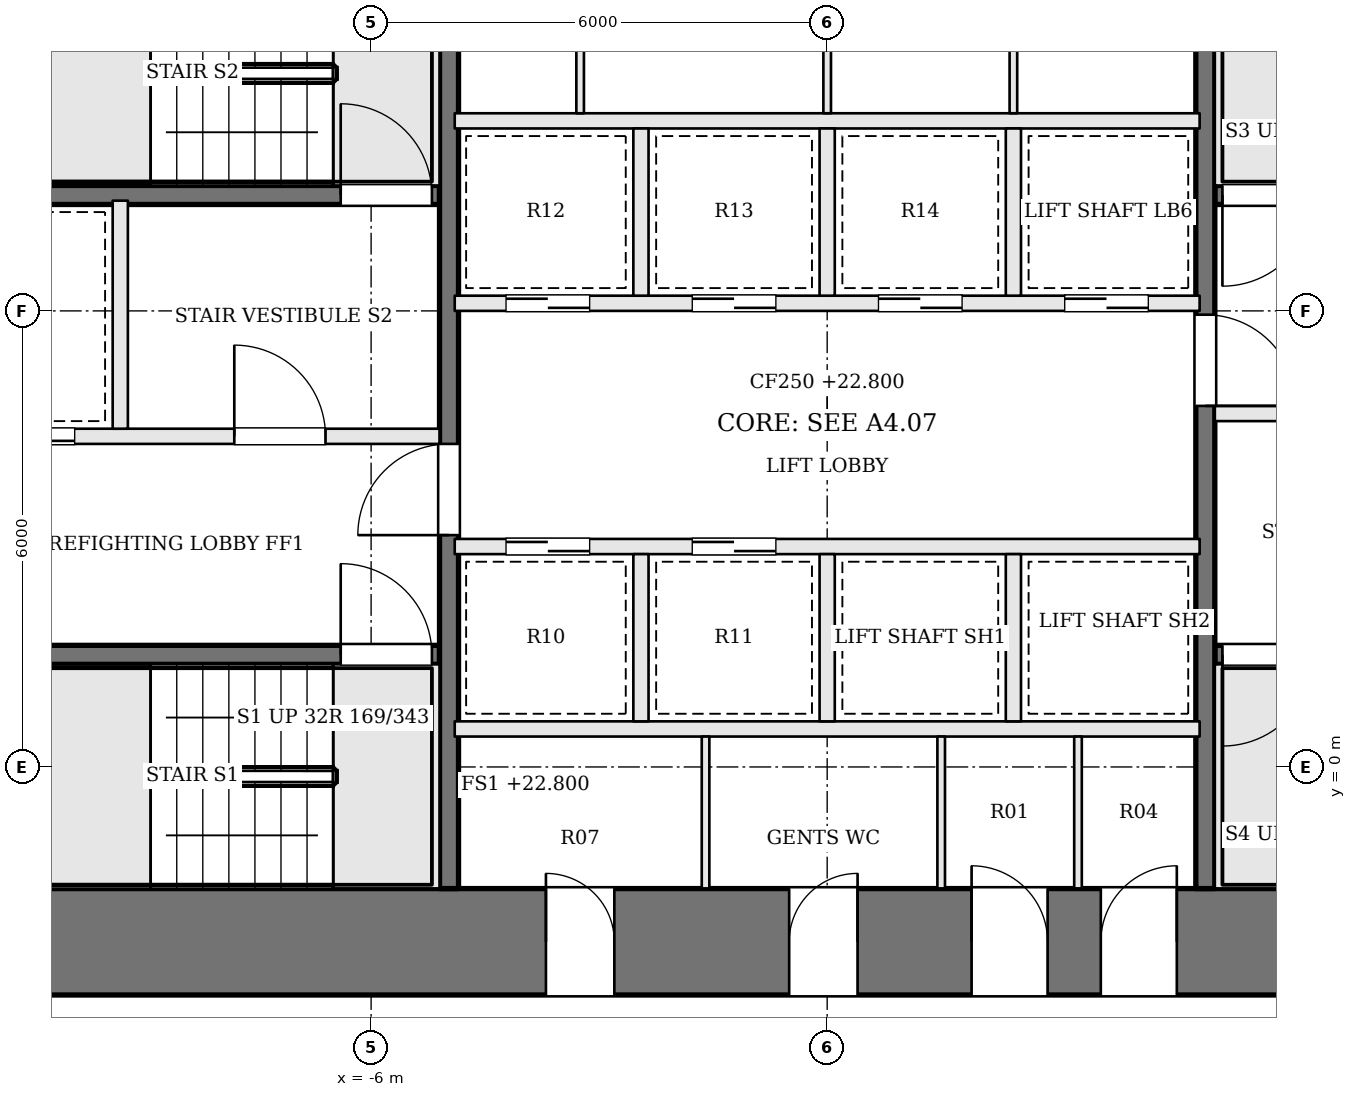
"""IFC4 building model, lengths in metres.
Left out: names, types, materials, properties, quantities, classifications, styles, units other than length and angle.
Written with IfcOpenShell. Run it as: python <this file> out.ifc"""

import sys

from ifc_helpers import new_model, si_unit, direction, frame, frame_2d, origin, place, context, subcontext, project, spatial, rectangle, extrude, element, fill, save


model = new_model("IFC4")
c1 = context("Model", 3, precision=1e-05, world=origin(), true_north=direction((0.0, 1.0)))
c2 = subcontext(c1, "Body", "Model", "MODEL_VIEW")
j1 = project(units=[si_unit("LENGTHUNIT", "METRE"), si_unit("PLANEANGLEUNIT", "RADIAN")], contexts=[c1])
p1 = place(None, origin())
s1 = spatial("IfcSite", under=j1, at=p1, CompositionType="ELEMENT")
p2 = place(p1, origin())
s2 = spatial("IfcBuilding", under=s1, at=p2, CompositionType="ELEMENT")
p3 = place(p2, frame((0.0, 0.0, 22.8)))
s3 = spatial("IfcBuildingStorey", under=s2, at=p3, CompositionType="ELEMENT", Elevation=22.8)
p4 = place(p3, frame((-13.0, -2.3, 0.0), z_axis=(0.0, 0.0, 1.0), x_axis=(1.0, 0.0, 0.0)))
e1 = element("IfcWall", 1, at=p4, inside=s3, PredefinedType="SHEAR", context=c2, shape_type="SweptSolid", body=[
    extrude(rectangle(XDim=26.0, YDim=1.4, at=frame_2d((13.0, 0.0))), origin(), (0.0, 0.0, 1.0), 5.4),
])
p5 = place(p4, frame((9.3, 0.0, 0.0)))
e2 = element("IfcOpeningElement", 2, at=p5, cuts=e1, PredefinedType="OPENING", context=c2, shape_type="SweptSolid", body=[
    extrude(rectangle(XDim=0.9, YDim=2.1, at=frame_2d((0.45, 1.05))), frame((0.0, 0.71, 0.0), z_axis=(0.0, -1.0, 0.0), x_axis=(1.0, 0.0, 0.0)), (0.0, 0.0, 1.0), 1.42),
])
p6 = place(p4, frame((12.5, 0.0, 0.0)))
e3 = element("IfcOpeningElement", 3, at=p6, cuts=e1, PredefinedType="OPENING", context=c2, shape_type="SweptSolid", body=[
    extrude(rectangle(XDim=0.9, YDim=2.1, at=frame_2d((0.45, 1.05))), frame((0.0, 0.71, 0.0), z_axis=(0.0, -1.0, 0.0), x_axis=(1.0, 0.0, 0.0)), (0.0, 0.0, 1.0), 1.42),
])
p7 = place(p4, frame((14.9, 0.0, 0.0)))
e4 = element("IfcOpeningElement", 4, at=p7, cuts=e1, PredefinedType="OPENING", context=c2, shape_type="SweptSolid", body=[
    extrude(rectangle(XDim=1.0, YDim=2.1, at=frame_2d((0.5, 1.05))), frame((0.0, 0.71, 0.0), z_axis=(0.0, -1.0, 0.0), x_axis=(1.0, 0.0, 0.0)), (0.0, 0.0, 1.0), 1.42),
])
p8 = place(p4, frame((16.6, 0.0, 0.0)))
e5 = element("IfcOpeningElement", 5, at=p8, cuts=e1, PredefinedType="OPENING", context=c2, shape_type="SweptSolid", body=[
    extrude(rectangle(XDim=1.0, YDim=2.1, at=frame_2d((0.5, 1.05))), frame((0.0, 0.71, 0.0), z_axis=(0.0, -1.0, 0.0), x_axis=(1.0, 0.0, 0.0)), (0.0, 0.0, 1.0), 1.42),
])
p9 = place(p3, frame((-11.6, 1.475, 0.0), z_axis=(0.0, 0.0, 1.0), x_axis=(1.0, 0.0, 0.0)))
e6 = element("IfcWall", 6, at=p9, inside=s3, PredefinedType="SOLIDWALL", context=c2, shape_type="SweptSolid", body=[
    extrude(rectangle(XDim=6.5, YDim=0.25, at=frame_2d((3.25, 0.0))), origin(), (0.0, 0.0, 1.0), 5.15),
])
p10 = place(p9, frame((5.2, 0.0, 0.0)))
e7 = element("IfcOpeningElement", 7, at=p10, cuts=e6, PredefinedType="OPENING", context=c2, shape_type="SweptSolid", body=[
    extrude(rectangle(XDim=1.2, YDim=2.1, at=frame_2d((0.6, 1.05))), frame((0.0, 0.135, 0.0), z_axis=(0.0, -1.0, 0.0), x_axis=(1.0, 0.0, 0.0)), (0.0, 0.0, 1.0), 0.27),
])
p11 = place(p3, frame((11.6, 7.525, 0.0), z_axis=(0.0, 0.0, 1.0), x_axis=(-1.0, 0.0, 0.0)))
e8 = element("IfcWall", 8, at=p11, inside=s3, PredefinedType="SOLIDWALL", context=c2, shape_type="SweptSolid", body=[
    extrude(rectangle(XDim=6.5, YDim=0.25, at=frame_2d((3.25, 0.0))), origin(), (0.0, 0.0, 1.0), 5.15),
])
p12 = place(p11, frame((5.2, 0.0, 0.0)))
e9 = element("IfcOpeningElement", 9, at=p12, cuts=e8, PredefinedType="OPENING", context=c2, shape_type="SweptSolid", body=[
    extrude(rectangle(XDim=1.2, YDim=2.1, at=frame_2d((0.6, 1.05))), frame((0.0, 0.135, 0.0), z_axis=(0.0, -1.0, 0.0), x_axis=(1.0, 0.0, 0.0)), (0.0, 0.0, 1.0), 0.27),
])
p13 = place(p3, frame((-11.6, 4.35, 0.0), z_axis=(0.0, 0.0, 1.0), x_axis=(1.0, 0.0, 0.0)))
e10 = element("IfcWall", 10, at=p13, inside=s3, PredefinedType="SOLIDWALL", context=c2, shape_type="SweptSolid", body=[
    extrude(rectangle(XDim=6.5, YDim=0.2, at=frame_2d((3.25, 0.0))), origin(), (0.0, 0.0, 1.0), 5.15),
])
p14 = place(p13, frame((3.8, 0.0, 0.0)))
e11 = element("IfcOpeningElement", 11, at=p14, cuts=e10, PredefinedType="OPENING", context=c2, shape_type="SweptSolid", body=[
    extrude(rectangle(XDim=1.2, YDim=2.1, at=frame_2d((0.6, 1.05))), frame((0.0, 0.11, 0.0), z_axis=(0.0, -1.0, 0.0), x_axis=(1.0, 0.0, 0.0)), (0.0, 0.0, 1.0), 0.22),
])
p15 = place(p13, frame((0.5, 0.0, 0.0)))
e12 = element("IfcOpeningElement", 12, at=p15, cuts=e10, PredefinedType="OPENING", context=c2, shape_type="SweptSolid", body=[
    extrude(rectangle(XDim=1.2, YDim=2.1, at=frame_2d((0.6, 1.05))), frame((0.0, 0.11, 0.0), z_axis=(0.0, -1.0, 0.0), x_axis=(1.0, 0.0, 0.0)), (0.0, 0.0, 1.0), 0.22),
])
p16 = place(p3, frame((11.6, 4.65, 0.0), z_axis=(0.0, 0.0, 1.0), x_axis=(-1.0, 0.0, 0.0)))
e13 = element("IfcWall", 13, at=p16, inside=s3, PredefinedType="SOLIDWALL", context=c2, shape_type="SweptSolid", body=[
    extrude(rectangle(XDim=6.5, YDim=0.2, at=frame_2d((3.25, 0.0))), origin(), (0.0, 0.0, 1.0), 5.15),
])
p17 = place(p16, frame((3.8, 0.0, 0.0)))
e14 = element("IfcOpeningElement", 14, at=p17, cuts=e13, PredefinedType="OPENING", context=c2, shape_type="SweptSolid", body=[
    extrude(rectangle(XDim=1.2, YDim=2.1, at=frame_2d((0.6, 1.05))), frame((0.0, 0.11, 0.0), z_axis=(0.0, -1.0, 0.0), x_axis=(1.0, 0.0, 0.0)), (0.0, 0.0, 1.0), 0.22),
])
p18 = place(p16, frame((0.5, 0.0, 0.0)))
e15 = element("IfcOpeningElement", 15, at=p18, cuts=e13, PredefinedType="OPENING", context=c2, shape_type="SweptSolid", body=[
    extrude(rectangle(XDim=1.2, YDim=2.1, at=frame_2d((0.6, 1.05))), frame((0.0, 0.11, 0.0), z_axis=(0.0, -1.0, 0.0), x_axis=(1.0, 0.0, 0.0)), (0.0, 0.0, 1.0), 0.22),
])
p19 = place(p3, frame((-11.6, 7.525, 0.0), z_axis=(0.0, 0.0, 1.0), x_axis=(1.0, 0.0, 0.0)))
e16 = element("IfcWall", 16, at=p19, inside=s3, PredefinedType="SOLIDWALL", context=c2, shape_type="SweptSolid", body=[
    extrude(rectangle(XDim=6.5, YDim=0.25, at=frame_2d((3.25, 0.0))), origin(), (0.0, 0.0, 1.0), 5.15),
])
p20 = place(p19, frame((5.2, 0.0, 0.0)))
e17 = element("IfcOpeningElement", 17, at=p20, cuts=e16, PredefinedType="OPENING", context=c2, shape_type="SweptSolid", body=[
    extrude(rectangle(XDim=1.2, YDim=2.1, at=frame_2d((0.6, 1.05))), frame((0.0, 0.135, 0.0), z_axis=(0.0, -1.0, 0.0), x_axis=(1.0, 0.0, 0.0)), (0.0, 0.0, 1.0), 0.27),
])
p21 = place(p3, frame((11.6, 1.475, 0.0), z_axis=(0.0, 0.0, 1.0), x_axis=(-1.0, 0.0, 0.0)))
e18 = element("IfcWall", 18, at=p21, inside=s3, PredefinedType="SOLIDWALL", context=c2, shape_type="SweptSolid", body=[
    extrude(rectangle(XDim=6.5, YDim=0.25, at=frame_2d((3.25, 0.0))), origin(), (0.0, 0.0, 1.0), 5.15),
])
p22 = place(p21, frame((5.2, 0.0, 0.0)))
e19 = element("IfcOpeningElement", 19, at=p22, cuts=e18, PredefinedType="OPENING", context=c2, shape_type="SweptSolid", body=[
    extrude(rectangle(XDim=1.2, YDim=2.1, at=frame_2d((0.6, 1.05))), frame((0.0, 0.135, 0.0), z_axis=(0.0, -1.0, 0.0), x_axis=(1.0, 0.0, 0.0)), (0.0, 0.0, 1.0), 0.27),
])
p23 = place(p3, frame((-9.3, 4.45, 0.0), z_axis=(0.0, 0.0, 1.0), x_axis=(0.0, 1.0, 0.0)))
e20 = element("IfcWall", 20, at=p23, inside=s3, PredefinedType="SOLIDWALL", context=c2, shape_type="SweptSolid", body=[
    extrude(rectangle(XDim=3.0, YDim=0.2, at=frame_2d((1.5, 0.0))), origin(), (0.0, 0.0, 1.0), 5.15),
])
p24 = place(p3, frame((-4.975, -1.6, 0.0), z_axis=(0.0, 0.0, 1.0), x_axis=(0.0, 1.0, 0.0)))
e21 = element("IfcWall", 21, at=p24, inside=s3, PredefinedType="SOLIDWALL", context=c2, shape_type="SweptSolid", body=[
    extrude(rectangle(XDim=12.2, YDim=0.25, at=frame_2d((6.1, 0.0))), origin(), (0.0, 0.0, 1.0), 5.15),
])
p25 = place(p24, frame((4.65, 0.0, 0.0)))
e22 = element("IfcOpeningElement", 22, at=p25, cuts=e21, PredefinedType="OPENING", context=c2, shape_type="SweptSolid", body=[
    extrude(rectangle(XDim=1.2, YDim=2.1, at=frame_2d((0.6, 1.05))), frame((0.0, 0.135, 0.0), z_axis=(0.0, -1.0, 0.0), x_axis=(1.0, 0.0, 0.0)), (0.0, 0.0, 1.0), 0.27),
])
p26 = place(p3, frame((4.975, 10.6, 0.0), z_axis=(0.0, 0.0, 1.0), x_axis=(0.0, -1.0, 0.0)))
e23 = element("IfcWall", 23, at=p26, inside=s3, PredefinedType="SOLIDWALL", context=c2, shape_type="SweptSolid", body=[
    extrude(rectangle(XDim=12.2, YDim=0.25, at=frame_2d((6.1, 0.0))), origin(), (0.0, 0.0, 1.0), 5.15),
])
p27 = place(p26, frame((4.65, 0.0, 0.0)))
e24 = element("IfcOpeningElement", 24, at=p27, cuts=e23, PredefinedType="OPENING", context=c2, shape_type="SweptSolid", body=[
    extrude(rectangle(XDim=1.2, YDim=2.1, at=frame_2d((0.6, 1.05))), frame((0.0, 0.135, 0.0), z_axis=(0.0, -1.0, 0.0), x_axis=(1.0, 0.0, 0.0)), (0.0, 0.0, 1.0), 0.27),
])
p28 = place(p3, frame((-4.9, 0.5, 0.0), z_axis=(0.0, 0.0, 1.0), x_axis=(1.0, 0.0, 0.0)))
e25 = element("IfcWall", 25, at=p28, inside=s3, PredefinedType="SOLIDWALL", context=c2, shape_type="SweptSolid", body=[
    extrude(rectangle(XDim=9.8, YDim=0.2, at=frame_2d((4.9, 0.0))), origin(), (0.0, 0.0, 1.0), 5.15),
])
p29 = place(p3, frame((-4.9, 2.9, 0.0), z_axis=(0.0, 0.0, 1.0), x_axis=(1.0, 0.0, 0.0)))
e26 = element("IfcWall", 26, at=p29, inside=s3, PredefinedType="SOLIDWALL", context=c2, shape_type="SweptSolid", body=[
    extrude(rectangle(XDim=9.8, YDim=0.2, at=frame_2d((4.9, 0.0))), origin(), (0.0, 0.0, 1.0), 5.15),
])
p30 = place(p29, frame((0.675, 0.0, 0.0)))
e27 = element("IfcOpeningElement", 27, at=p30, cuts=e26, PredefinedType="OPENING", context=c2, shape_type="SweptSolid", body=[
    extrude(rectangle(XDim=1.1, YDim=2.1, at=frame_2d((0.55, 1.05))), frame((0.0, 0.11, 0.0), z_axis=(0.0, -1.0, 0.0), x_axis=(1.0, 0.0, 0.0)), (0.0, 0.0, 1.0), 0.22),
])
p31 = place(p29, frame((3.125, 0.0, 0.0)))
e28 = element("IfcOpeningElement", 28, at=p31, cuts=e26, PredefinedType="OPENING", context=c2, shape_type="SweptSolid", body=[
    extrude(rectangle(XDim=1.1, YDim=2.1, at=frame_2d((0.55, 1.05))), frame((0.0, 0.11, 0.0), z_axis=(0.0, -1.0, 0.0), x_axis=(1.0, 0.0, 0.0)), (0.0, 0.0, 1.0), 0.22),
])
p32 = place(p3, frame((-4.9, 6.1, 0.0), z_axis=(0.0, 0.0, 1.0), x_axis=(1.0, 0.0, 0.0)))
e29 = element("IfcWall", 29, at=p32, inside=s3, PredefinedType="SOLIDWALL", context=c2, shape_type="SweptSolid", body=[
    extrude(rectangle(XDim=9.8, YDim=0.2, at=frame_2d((4.9, 0.0))), origin(), (0.0, 0.0, 1.0), 5.15),
])
p33 = place(p32, frame((0.675, 0.0, 0.0)))
e30 = element("IfcOpeningElement", 30, at=p33, cuts=e29, PredefinedType="OPENING", context=c2, shape_type="SweptSolid", body=[
    extrude(rectangle(XDim=1.1, YDim=2.1, at=frame_2d((0.55, 1.05))), frame((0.0, 0.11, 0.0), z_axis=(0.0, -1.0, 0.0), x_axis=(1.0, 0.0, 0.0)), (0.0, 0.0, 1.0), 0.22),
])
p34 = place(p32, frame((3.125, 0.0, 0.0)))
e31 = element("IfcOpeningElement", 31, at=p34, cuts=e29, PredefinedType="OPENING", context=c2, shape_type="SweptSolid", body=[
    extrude(rectangle(XDim=1.1, YDim=2.1, at=frame_2d((0.55, 1.05))), frame((0.0, 0.11, 0.0), z_axis=(0.0, -1.0, 0.0), x_axis=(1.0, 0.0, 0.0)), (0.0, 0.0, 1.0), 0.22),
])
p35 = place(p32, frame((5.575, 0.0, 0.0)))
e32 = element("IfcOpeningElement", 32, at=p35, cuts=e29, PredefinedType="OPENING", context=c2, shape_type="SweptSolid", body=[
    extrude(rectangle(XDim=1.1, YDim=2.1, at=frame_2d((0.55, 1.05))), frame((0.0, 0.11, 0.0), z_axis=(0.0, -1.0, 0.0), x_axis=(1.0, 0.0, 0.0)), (0.0, 0.0, 1.0), 0.22),
])
p36 = place(p32, frame((8.025, 0.0, 0.0)))
e33 = element("IfcOpeningElement", 33, at=p36, cuts=e29, PredefinedType="OPENING", context=c2, shape_type="SweptSolid", body=[
    extrude(rectangle(XDim=1.1, YDim=2.1, at=frame_2d((0.55, 1.05))), frame((0.0, 0.11, 0.0), z_axis=(0.0, -1.0, 0.0), x_axis=(1.0, 0.0, 0.0)), (0.0, 0.0, 1.0), 0.22),
])
p37 = place(p3, frame((-4.9, 8.5, 0.0), z_axis=(0.0, 0.0, 1.0), x_axis=(1.0, 0.0, 0.0)))
e34 = element("IfcWall", 34, at=p37, inside=s3, PredefinedType="SOLIDWALL", context=c2, shape_type="SweptSolid", body=[
    extrude(rectangle(XDim=9.8, YDim=0.2, at=frame_2d((4.9, 0.0))), origin(), (0.0, 0.0, 1.0), 5.15),
])
for number, where, z_axis, x_axis in (
    (35, (-2.45, 0.6, 0.0), (0.0, 0.0, 1.0), (0.0, 1.0, 0.0)),
    (36, (0.0, 0.6, 0.0), (0.0, 0.0, 1.0), (0.0, 1.0, 0.0)),
    (37, (2.45, 0.6, 0.0), (0.0, 0.0, 1.0), (0.0, 1.0, 0.0)),
    (38, (-2.45, 6.2, 0.0), (0.0, 0.0, 1.0), (0.0, 1.0, 0.0)),
    (39, (0.0, 6.2, 0.0), (0.0, 0.0, 1.0), (0.0, 1.0, 0.0)),
    (40, (2.45, 6.2, 0.0), (0.0, 0.0, 1.0), (0.0, 1.0, 0.0)),
):
    element("IfcWall", number, at=place(p3, frame(where, z_axis=z_axis, x_axis=x_axis)), inside=s3, PredefinedType="SOLIDWALL", context=c2, shape_type="SweptSolid", body=[
        extrude(rectangle(XDim=2.2, YDim=0.2, at=frame_2d((1.1, 0.0))), origin(), (0.0, 0.0, 1.0), 5.15),
    ])
for number, where, z_axis, x_axis in (
    (41, (-1.6, -1.6, 0.0), (0.0, 0.0, 1.0), (0.0, 1.0, 0.0)),
    (42, (1.5, -1.6, 0.0), (0.0, 0.0, 1.0), (0.0, 1.0, 0.0)),
    (43, (3.3, -1.6, 0.0), (0.0, 0.0, 1.0), (0.0, 1.0, 0.0)),
    (44, (-3.25, 8.6, 0.0), (0.0, 0.0, 1.0), (0.0, 1.0, 0.0)),
    (45, (0.0, 8.6, 0.0), (0.0, 0.0, 1.0), (0.0, 1.0, 0.0)),
    (46, (2.45, 8.6, 0.0), (0.0, 0.0, 1.0), (0.0, 1.0, 0.0)),
):
    element("IfcWall", number, at=place(p3, frame(where, z_axis=z_axis, x_axis=x_axis)), inside=s3, PredefinedType="PARTITIONING", context=c2, shape_type="SweptSolid", body=[
        extrude(rectangle(XDim=2.0, YDim=0.1, at=frame_2d((1.0, 0.0))), origin(), (0.0, 0.0, 1.0), 5.15),
    ])
p38 = place(p25, origin())
e47 = element("IfcDoor", 47, at=p38, inside=s3, OperationType="SINGLE_SWING_LEFT", PredefinedType="DOOR", context=c2, shape_type="SweptSolid", body=[
    extrude(rectangle(XDim=1.2, YDim=2.1, at=frame_2d((0.6, 1.05))), frame((0.0, 0.025, 0.0), z_axis=(0.0, -1.0, 0.0), x_axis=(1.0, 0.0, 0.0)), (0.0, 0.0, 1.0), 0.05),
])
fill(e22, e47)
p39 = place(p27, origin())
e48 = element("IfcDoor", 48, at=p39, inside=s3, OperationType="SINGLE_SWING_RIGHT", PredefinedType="DOOR", context=c2, shape_type="SweptSolid", body=[
    extrude(rectangle(XDim=1.2, YDim=2.1, at=frame_2d((0.6, 1.05))), frame((0.0, 0.025, 0.0), z_axis=(0.0, -1.0, 0.0), x_axis=(1.0, 0.0, 0.0)), (0.0, 0.0, 1.0), 0.05),
])
fill(e24, e48)
p40 = place(p14, origin())
e49 = element("IfcDoor", 49, at=p40, inside=s3, OperationType="SINGLE_SWING_LEFT", PredefinedType="DOOR", context=c2, shape_type="SweptSolid", body=[
    extrude(rectangle(XDim=1.2, YDim=2.1, at=frame_2d((0.6, 1.05))), frame((0.0, 0.025, 0.0), z_axis=(0.0, -1.0, 0.0), x_axis=(1.0, 0.0, 0.0)), (0.0, 0.0, 1.0), 0.05),
])
fill(e11, e49)
p41 = place(p10, origin())
e50 = element("IfcDoor", 50, at=p41, inside=s3, OperationType="SINGLE_SWING_LEFT", PredefinedType="DOOR", context=c2, shape_type="SweptSolid", body=[
    extrude(rectangle(XDim=1.2, YDim=2.1, at=frame_2d((0.6, 1.05))), frame((0.0, 0.025, 0.0), z_axis=(0.0, -1.0, 0.0), x_axis=(1.0, 0.0, 0.0)), (0.0, 0.0, 1.0), 0.05),
])
fill(e7, e50)
p42 = place(p12, origin())
e51 = element("IfcDoor", 51, at=p42, inside=s3, OperationType="SINGLE_SWING_RIGHT", PredefinedType="DOOR", context=c2, shape_type="SweptSolid", body=[
    extrude(rectangle(XDim=1.2, YDim=2.1, at=frame_2d((0.6, 1.05))), frame((0.0, 0.025, 0.0), z_axis=(0.0, -1.0, 0.0), x_axis=(1.0, 0.0, 0.0)), (0.0, 0.0, 1.0), 0.05),
])
fill(e9, e51)
p43 = place(p20, origin())
e52 = element("IfcDoor", 52, at=p43, inside=s3, OperationType="SINGLE_SWING_LEFT", PredefinedType="DOOR", context=c2, shape_type="SweptSolid", body=[
    extrude(rectangle(XDim=1.2, YDim=2.1, at=frame_2d((0.6, 1.05))), frame((0.0, 0.025, 0.0), z_axis=(0.0, -1.0, 0.0), x_axis=(1.0, 0.0, 0.0)), (0.0, 0.0, 1.0), 0.05),
])
fill(e17, e52)
p44 = place(p22, origin())
e53 = element("IfcDoor", 53, at=p44, inside=s3, OperationType="SINGLE_SWING_RIGHT", PredefinedType="DOOR", context=c2, shape_type="SweptSolid", body=[
    extrude(rectangle(XDim=1.2, YDim=2.1, at=frame_2d((0.6, 1.05))), frame((0.0, 0.025, 0.0), z_axis=(0.0, -1.0, 0.0), x_axis=(1.0, 0.0, 0.0)), (0.0, 0.0, 1.0), 0.05),
])
fill(e19, e53)
p45 = place(p15, origin())
e54 = element("IfcDoor", 54, at=p45, inside=s3, OperationType="SLIDING_TO_RIGHT", PredefinedType="DOOR", context=c2, shape_type="SweptSolid", body=[
    extrude(rectangle(XDim=1.2, YDim=2.1, at=frame_2d((0.6, 1.05))), frame((0.0, 0.025, 0.0), z_axis=(0.0, -1.0, 0.0), x_axis=(1.0, 0.0, 0.0)), (0.0, 0.0, 1.0), 0.05),
])
fill(e12, e54)
p46 = place(p30, origin())
e55 = element("IfcDoor", 55, at=p46, inside=s3, OperationType="SLIDING_TO_RIGHT", PredefinedType="DOOR", context=c2, shape_type="SweptSolid", body=[
    extrude(rectangle(XDim=1.1, YDim=2.1, at=frame_2d((0.55, 1.05))), frame((0.0, 0.025, 0.0), z_axis=(0.0, -1.0, 0.0), x_axis=(1.0, 0.0, 0.0)), (0.0, 0.0, 1.0), 0.05),
])
fill(e27, e55)
p47 = place(p31, origin())
e56 = element("IfcDoor", 56, at=p47, inside=s3, OperationType="SLIDING_TO_LEFT", PredefinedType="DOOR", context=c2, shape_type="SweptSolid", body=[
    extrude(rectangle(XDim=1.1, YDim=2.1, at=frame_2d((0.55, 1.05))), frame((0.0, 0.025, 0.0), z_axis=(0.0, -1.0, 0.0), x_axis=(1.0, 0.0, 0.0)), (0.0, 0.0, 1.0), 0.05),
])
fill(e28, e56)
p48 = place(p33, origin())
e57 = element("IfcDoor", 57, at=p48, inside=s3, OperationType="SLIDING_TO_RIGHT", PredefinedType="DOOR", context=c2, shape_type="SweptSolid", body=[
    extrude(rectangle(XDim=1.1, YDim=2.1, at=frame_2d((0.55, 1.05))), frame((0.0, 0.025, 0.0), z_axis=(0.0, -1.0, 0.0), x_axis=(1.0, 0.0, 0.0)), (0.0, 0.0, 1.0), 0.05),
])
fill(e30, e57)
p49 = place(p34, origin())
e58 = element("IfcDoor", 58, at=p49, inside=s3, OperationType="SLIDING_TO_LEFT", PredefinedType="DOOR", context=c2, shape_type="SweptSolid", body=[
    extrude(rectangle(XDim=1.1, YDim=2.1, at=frame_2d((0.55, 1.05))), frame((0.0, 0.025, 0.0), z_axis=(0.0, -1.0, 0.0), x_axis=(1.0, 0.0, 0.0)), (0.0, 0.0, 1.0), 0.05),
])
fill(e31, e58)
p50 = place(p35, origin())
e59 = element("IfcDoor", 59, at=p50, inside=s3, OperationType="SLIDING_TO_RIGHT", PredefinedType="DOOR", context=c2, shape_type="SweptSolid", body=[
    extrude(rectangle(XDim=1.1, YDim=2.1, at=frame_2d((0.55, 1.05))), frame((0.0, 0.025, 0.0), z_axis=(0.0, -1.0, 0.0), x_axis=(1.0, 0.0, 0.0)), (0.0, 0.0, 1.0), 0.05),
])
fill(e32, e59)
p51 = place(p36, origin())
e60 = element("IfcDoor", 60, at=p51, inside=s3, OperationType="SLIDING_TO_LEFT", PredefinedType="DOOR", context=c2, shape_type="SweptSolid", body=[
    extrude(rectangle(XDim=1.1, YDim=2.1, at=frame_2d((0.55, 1.05))), frame((0.0, 0.025, 0.0), z_axis=(0.0, -1.0, 0.0), x_axis=(1.0, 0.0, 0.0)), (0.0, 0.0, 1.0), 0.05),
])
fill(e33, e60)
p52 = place(p5, origin())
e61 = element("IfcDoor", 61, at=p52, inside=s3, OperationType="SINGLE_SWING_LEFT", PredefinedType="DOOR", context=c2, shape_type="SweptSolid", body=[
    extrude(rectangle(XDim=0.9, YDim=2.1, at=frame_2d((0.45, 1.05))), frame((0.0, 0.025, 0.0), z_axis=(0.0, -1.0, 0.0), x_axis=(1.0, 0.0, 0.0)), (0.0, 0.0, 1.0), 0.05),
])
fill(e2, e61)
p53 = place(p6, origin())
e62 = element("IfcDoor", 62, at=p53, inside=s3, OperationType="SINGLE_SWING_RIGHT", PredefinedType="DOOR", context=c2, shape_type="SweptSolid", body=[
    extrude(rectangle(XDim=0.9, YDim=2.1, at=frame_2d((0.45, 1.05))), frame((0.0, 0.025, 0.0), z_axis=(0.0, -1.0, 0.0), x_axis=(1.0, 0.0, 0.0)), (0.0, 0.0, 1.0), 0.05),
])
fill(e3, e62)
p54 = place(p7, origin())
e63 = element("IfcDoor", 63, at=p54, inside=s3, OperationType="SINGLE_SWING_LEFT", PredefinedType="DOOR", context=c2, shape_type="SweptSolid", body=[
    extrude(rectangle(XDim=1.0, YDim=2.1, at=frame_2d((0.5, 1.05))), frame((0.0, 0.025, 0.0), z_axis=(0.0, -1.0, 0.0), x_axis=(1.0, 0.0, 0.0)), (0.0, 0.0, 1.0), 0.05),
])
fill(e4, e63)
p55 = place(p8, origin())
e64 = element("IfcDoor", 64, at=p55, inside=s3, OperationType="SINGLE_SWING_RIGHT", PredefinedType="DOOR", context=c2, shape_type="SweptSolid", body=[
    extrude(rectangle(XDim=1.0, YDim=2.1, at=frame_2d((0.5, 1.05))), frame((0.0, 0.025, 0.0), z_axis=(0.0, -1.0, 0.0), x_axis=(1.0, 0.0, 0.0)), (0.0, 0.0, 1.0), 0.05),
])
fill(e5, e64)
save(model, sys.argv[1])
